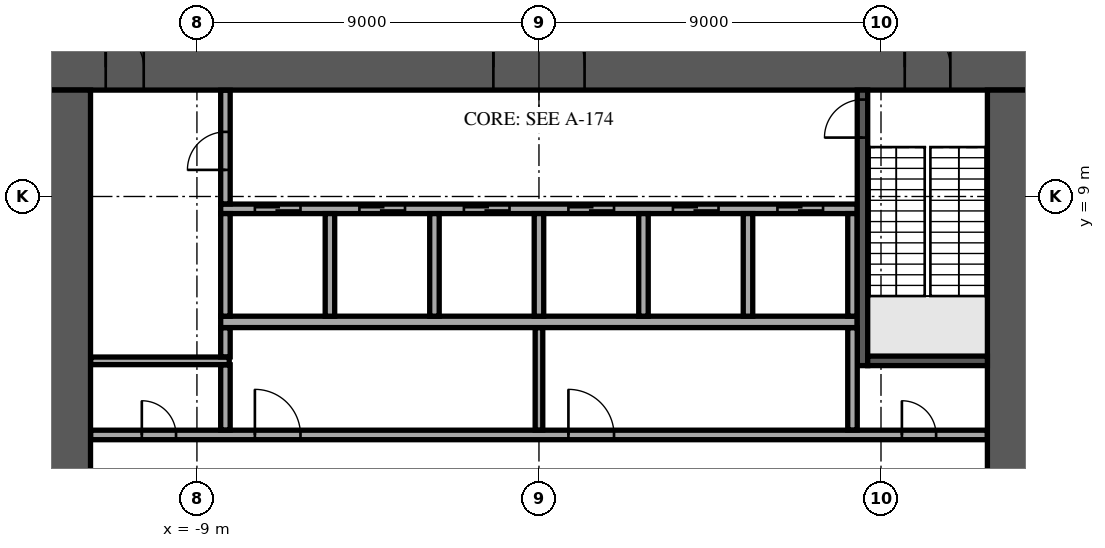
"""IFC4 building model, lengths in metres.
Left out: names, types, materials, properties, quantities, classifications, styles, units other than length and angle.
Written with IfcOpenShell. Run it as: python <this file> out.ifc"""

import sys

from ifc_helpers import new_model, si_unit, direction, frame, frame_2d, origin, place, context, subcontext, project, spatial, rectangle, extrude, element, fill, save


model = new_model("IFC4")
c1 = context("Model", 3, precision=1e-05, world=origin(), true_north=direction((0.0, 1.0)))
c2 = subcontext(c1, "Body", "Model", "MODEL_VIEW")
j1 = project(units=[si_unit("LENGTHUNIT", "METRE"), si_unit("PLANEANGLEUNIT", "RADIAN")], contexts=[c1])
p1 = place(None, origin())
s1 = spatial("IfcSite", under=j1, at=p1, CompositionType="ELEMENT")
p2 = place(p1, origin())
s2 = spatial("IfcBuilding", under=s1, at=p2, CompositionType="ELEMENT")
p3 = place(p2, frame((0.0, 0.0, 76.5)))
s3 = spatial("IfcBuildingStorey", under=s2, at=p3, CompositionType="ELEMENT", Elevation=76.5)
p4 = place(p3, frame((-13.0, 12.4, 0.0), z_axis=(0.0, 0.0, 1.0), x_axis=(1.0, 0.0, 0.0)))
e1 = element("IfcWall", 1, at=p4, inside=s3, PredefinedType="SHEAR", context=c2, shape_type="SweptSolid", body=[
    extrude(rectangle(XDim=26.0, YDim=1.2, at=frame_2d((13.0, 0.0))), origin(), (0.0, 0.0, 1.0), 5.18),
])
p5 = place(p4, frame((11.8, 0.0, 0.0)))
e2 = element("IfcOpeningElement", 2, at=p5, cuts=e1, PredefinedType="OPENING", context=c2, shape_type="SweptSolid", body=[
    extrude(rectangle(XDim=2.4, YDim=2.4, at=frame_2d((1.2, 1.2))), frame((0.0, 0.61, 0.0), z_axis=(0.0, -1.0, 0.0), x_axis=(1.0, 0.0, 0.0)), (0.0, 0.0, 1.0), 1.22),
])
p6 = place(p4, frame((22.625, 0.0, 0.0)))
e3 = element("IfcOpeningElement", 3, at=p6, cuts=e1, PredefinedType="OPENING", context=c2, shape_type="SweptSolid", body=[
    extrude(rectangle(XDim=1.2, YDim=2.1, at=frame_2d((0.6, 1.05))), frame((0.0, 0.61, 0.0), z_axis=(0.0, -1.0, 0.0), x_axis=(1.0, 0.0, 0.0)), (0.0, 0.0, 1.0), 1.22),
])
p7 = place(p4, frame((1.6, 0.0, 0.0)))
e4 = element("IfcOpeningElement", 4, at=p7, cuts=e1, PredefinedType="OPENING", context=c2, shape_type="SweptSolid", body=[
    extrude(rectangle(XDim=1.0, YDim=2.1, at=frame_2d((0.5, 1.05))), frame((0.0, 0.61, 0.0), z_axis=(0.0, -1.0, 0.0), x_axis=(1.0, 0.0, 0.0)), (0.0, 0.0, 1.0), 1.22),
])
p8 = place(p3, frame((12.4, -11.8, 0.0), z_axis=(0.0, 0.0, 1.0), x_axis=(0.0, 1.0, 0.0)))
e5 = element("IfcWall", 5, at=p8, inside=s3, PredefinedType="SHEAR", context=c2, shape_type="SweptSolid", body=[
    extrude(rectangle(XDim=23.6, YDim=1.2, at=frame_2d((11.8, 0.0))), origin(), (0.0, 0.0, 1.0), 5.18),
])
p9 = place(p8, frame((10.6, 0.0, 0.0)))
e6 = element("IfcOpeningElement", 6, at=p9, cuts=e5, PredefinedType="OPENING", context=c2, shape_type="SweptSolid", body=[
    extrude(rectangle(XDim=2.4, YDim=2.4, at=frame_2d((1.2, 1.2))), frame((0.0, 0.61, 0.0), z_axis=(0.0, -1.0, 0.0), x_axis=(1.0, 0.0, 0.0)), (0.0, 0.0, 1.0), 1.22),
])
p10 = place(p3, frame((-12.4, -11.8, 0.0), z_axis=(0.0, 0.0, 1.0), x_axis=(0.0, 1.0, 0.0)))
e7 = element("IfcWall", 7, at=p10, inside=s3, PredefinedType="SHEAR", context=c2, shape_type="SweptSolid", body=[
    extrude(rectangle(XDim=23.6, YDim=1.2, at=frame_2d((11.8, 0.0))), origin(), (0.0, 0.0, 1.0), 5.18),
])
p11 = place(p10, frame((10.6, 0.0, 0.0)))
e8 = element("IfcOpeningElement", 8, at=p11, cuts=e7, PredefinedType="OPENING", context=c2, shape_type="SweptSolid", body=[
    extrude(rectangle(XDim=2.4, YDim=2.4, at=frame_2d((1.2, 1.2))), frame((0.0, 0.61, 0.0), z_axis=(0.0, -1.0, 0.0), x_axis=(1.0, 0.0, 0.0)), (0.0, 0.0, 1.0), 1.22),
])
p12 = place(p3, frame((-8.375, 5.7, 0.0), z_axis=(0.0, 0.0, 1.0), x_axis=(1.0, 0.0, 0.0)))
e9 = element("IfcWall", 9, at=p12, inside=s3, PredefinedType="SOLIDWALL", context=c2, shape_type="SweptSolid", body=[
    extrude(rectangle(XDim=16.75, YDim=0.3, at=frame_2d((8.375, 0.0))), origin(), (0.0, 0.0, 1.0), 5.18),
])
p13 = place(p3, frame((-8.375, 8.675, 0.0), z_axis=(0.0, 0.0, 1.0), x_axis=(1.0, 0.0, 0.0)))
e10 = element("IfcWall", 10, at=p13, inside=s3, PredefinedType="SOLIDWALL", context=c2, shape_type="SweptSolid", body=[
    extrude(rectangle(XDim=16.75, YDim=0.25, at=frame_2d((8.375, 0.0))), origin(), (0.0, 0.0, 1.0), 5.18),
])
p14 = place(p13, frame((0.9, 0.0, 0.0)))
e11 = element("IfcOpeningElement", 11, at=p14, cuts=e10, PredefinedType="OPENING", context=c2, shape_type="SweptSolid", body=[
    extrude(rectangle(XDim=1.2, YDim=2.1, at=frame_2d((0.6, 1.05))), frame((0.0, 0.135, 0.0), z_axis=(0.0, -1.0, 0.0), x_axis=(1.0, 0.0, 0.0)), (0.0, 0.0, 1.0), 0.27),
])
p15 = place(p13, frame((3.65, 0.0, 0.0)))
e12 = element("IfcOpeningElement", 12, at=p15, cuts=e10, PredefinedType="OPENING", context=c2, shape_type="SweptSolid", body=[
    extrude(rectangle(XDim=1.2, YDim=2.1, at=frame_2d((0.6, 1.05))), frame((0.0, 0.135, 0.0), z_axis=(0.0, -1.0, 0.0), x_axis=(1.0, 0.0, 0.0)), (0.0, 0.0, 1.0), 0.27),
])
p16 = place(p13, frame((6.4, 0.0, 0.0)))
e13 = element("IfcOpeningElement", 13, at=p16, cuts=e10, PredefinedType="OPENING", context=c2, shape_type="SweptSolid", body=[
    extrude(rectangle(XDim=1.2, YDim=2.1, at=frame_2d((0.6, 1.05))), frame((0.0, 0.135, 0.0), z_axis=(0.0, -1.0, 0.0), x_axis=(1.0, 0.0, 0.0)), (0.0, 0.0, 1.0), 0.27),
])
p17 = place(p13, frame((9.15, 0.0, 0.0)))
e14 = element("IfcOpeningElement", 14, at=p17, cuts=e10, PredefinedType="OPENING", context=c2, shape_type="SweptSolid", body=[
    extrude(rectangle(XDim=1.2, YDim=2.1, at=frame_2d((0.6, 1.05))), frame((0.0, 0.135, 0.0), z_axis=(0.0, -1.0, 0.0), x_axis=(1.0, 0.0, 0.0)), (0.0, 0.0, 1.0), 0.27),
])
p18 = place(p13, frame((11.9, 0.0, 0.0)))
e15 = element("IfcOpeningElement", 15, at=p18, cuts=e10, PredefinedType="OPENING", context=c2, shape_type="SweptSolid", body=[
    extrude(rectangle(XDim=1.2, YDim=2.1, at=frame_2d((0.6, 1.05))), frame((0.0, 0.135, 0.0), z_axis=(0.0, -1.0, 0.0), x_axis=(1.0, 0.0, 0.0)), (0.0, 0.0, 1.0), 0.27),
])
p19 = place(p13, frame((14.65, 0.0, 0.0)))
e16 = element("IfcOpeningElement", 16, at=p19, cuts=e10, PredefinedType="OPENING", context=c2, shape_type="SweptSolid", body=[
    extrude(rectangle(XDim=1.2, YDim=2.1, at=frame_2d((0.6, 1.05))), frame((0.0, 0.135, 0.0), z_axis=(0.0, -1.0, 0.0), x_axis=(1.0, 0.0, 0.0)), (0.0, 0.0, 1.0), 0.27),
])
for number, where, z_axis, x_axis in (
    (17, (-8.25, 5.85, 0.0), (0.0, 0.0, 1.0), (0.0, 1.0, 0.0)),
    (18, (-5.5, 5.85, 0.0), (0.0, 0.0, 1.0), (0.0, 1.0, 0.0)),
    (19, (-2.75, 5.85, 0.0), (0.0, 0.0, 1.0), (0.0, 1.0, 0.0)),
    (20, (0.0, 5.85, 0.0), (0.0, 0.0, 1.0), (0.0, 1.0, 0.0)),
    (21, (2.75, 5.85, 0.0), (0.0, 0.0, 1.0), (0.0, 1.0, 0.0)),
    (22, (5.5, 5.85, 0.0), (0.0, 0.0, 1.0), (0.0, 1.0, 0.0)),
    (23, (8.25, 5.85, 0.0), (0.0, 0.0, 1.0), (0.0, 1.0, 0.0)),
):
    element("IfcWall", number, at=place(p3, frame(where, z_axis=z_axis, x_axis=x_axis)), inside=s3, PredefinedType="SOLIDWALL", context=c2, shape_type="SweptSolid", body=[
        extrude(rectangle(XDim=2.7, YDim=0.25, at=frame_2d((1.35, 0.0))), origin(), (0.0, 0.0, 1.0), 5.18),
    ])
p20 = place(p3, frame((8.512, 4.55, 0.0), z_axis=(0.0, 0.0, 1.0), x_axis=(0.0, 1.0, 0.0)))
e24 = element("IfcWall", 24, at=p20, inside=s3, PredefinedType="SOLIDWALL", context=c2, shape_type="SweptSolid", body=[
    extrude(rectangle(XDim=7.25, YDim=0.275, at=frame_2d((3.625, 0.0))), origin(), (0.0, 0.0, 1.0), 5.18),
])
p21 = place(p20, frame((6.0, 0.0, 0.0)))
e25 = element("IfcOpeningElement", 25, at=p21, cuts=e24, PredefinedType="OPENING", context=c2, shape_type="SweptSolid", body=[
    extrude(rectangle(XDim=1.0, YDim=2.1, at=frame_2d((0.5, 1.05))), frame((0.0, 0.147, 0.0), z_axis=(0.0, -1.0, 0.0), x_axis=(1.0, 0.0, 0.0)), (0.0, 0.0, 1.0), 0.295),
])
p22 = place(p3, frame((8.65, 4.675, 0.0), z_axis=(0.0, 0.0, 1.0), x_axis=(1.0, 0.0, 0.0)))
e26 = element("IfcWall", 26, at=p22, inside=s3, PredefinedType="SOLIDWALL", context=c2, shape_type="SweptSolid", body=[
    extrude(rectangle(XDim=3.15, YDim=0.25, at=frame_2d((1.575, 0.0))), origin(), (0.0, 0.0, 1.0), 5.18),
])
p23 = place(p3, frame((-11.795, 2.725, 0.0), z_axis=(0.0, 0.0, 1.0), x_axis=(1.0, 0.0, 0.0)))
e27 = element("IfcWall", 27, at=p23, inside=s3, PredefinedType="PARTITIONING", context=c2, shape_type="SweptSolid", body=[
    extrude(rectangle(XDim=23.59, YDim=0.25, at=frame_2d((11.795, 0.0))), origin(), (0.0, 0.0, 1.0), 5.18),
])
p24 = place(p23, frame((21.345, 0.0, 0.0)))
e28 = element("IfcOpeningElement", 28, at=p24, cuts=e27, PredefinedType="OPENING", context=c2, shape_type="SweptSolid", body=[
    extrude(rectangle(XDim=0.9, YDim=2.1, at=frame_2d((0.45, 1.05))), frame((0.0, 0.135, 0.0), z_axis=(0.0, -1.0, 0.0), x_axis=(1.0, 0.0, 0.0)), (0.0, 0.0, 1.0), 0.27),
])
p25 = place(p23, frame((1.345, 0.0, 0.0)))
e29 = element("IfcOpeningElement", 29, at=p25, cuts=e27, PredefinedType="OPENING", context=c2, shape_type="SweptSolid", body=[
    extrude(rectangle(XDim=0.9, YDim=2.1, at=frame_2d((0.45, 1.05))), frame((0.0, 0.135, 0.0), z_axis=(0.0, -1.0, 0.0), x_axis=(1.0, 0.0, 0.0)), (0.0, 0.0, 1.0), 0.27),
])
p26 = place(p23, frame((4.32, 0.0, 0.0)))
e30 = element("IfcOpeningElement", 30, at=p26, cuts=e27, PredefinedType="OPENING", context=c2, shape_type="SweptSolid", body=[
    extrude(rectangle(XDim=1.2, YDim=2.1, at=frame_2d((0.6, 1.05))), frame((0.0, 0.135, 0.0), z_axis=(0.0, -1.0, 0.0), x_axis=(1.0, 0.0, 0.0)), (0.0, 0.0, 1.0), 0.27),
])
p27 = place(p23, frame((12.57, 0.0, 0.0)))
e31 = element("IfcOpeningElement", 31, at=p27, cuts=e27, PredefinedType="OPENING", context=c2, shape_type="SweptSolid", body=[
    extrude(rectangle(XDim=1.2, YDim=2.1, at=frame_2d((0.6, 1.05))), frame((0.0, 0.135, 0.0), z_axis=(0.0, -1.0, 0.0), x_axis=(1.0, 0.0, 0.0)), (0.0, 0.0, 1.0), 0.27),
])
p28 = place(p3, frame((-8.25, 2.855, 0.0), z_axis=(0.0, 0.0, 1.0), x_axis=(0.0, 1.0, 0.0)))
e32 = element("IfcWall", 32, at=p28, inside=s3, PredefinedType="PARTITIONING", context=c2, shape_type="SweptSolid", body=[
    extrude(rectangle(XDim=1.715, YDim=0.25, at=frame_2d((0.857, 0.0))), origin(), (0.0, 0.0, 1.0), 5.18),
])
p29 = place(p3, frame((0.0, 2.855, 0.0), z_axis=(0.0, 0.0, 1.0), x_axis=(0.0, 1.0, 0.0)))
e33 = element("IfcWall", 33, at=p29, inside=s3, PredefinedType="PARTITIONING", context=c2, shape_type="SweptSolid", body=[
    extrude(rectangle(XDim=2.69, YDim=0.2, at=frame_2d((1.345, 0.0))), origin(), (0.0, 0.0, 1.0), 5.18),
])
p30 = place(p3, frame((8.25, 2.855, 0.0), z_axis=(0.0, 0.0, 1.0), x_axis=(0.0, 1.0, 0.0)))
e34 = element("IfcWall", 34, at=p30, inside=s3, PredefinedType="PARTITIONING", context=c2, shape_type="SweptSolid", body=[
    extrude(rectangle(XDim=2.69, YDim=0.25, at=frame_2d((1.345, 0.0))), origin(), (0.0, 0.0, 1.0), 5.18),
])
p31 = place(p3, frame((-11.795, 4.675, 0.0), z_axis=(0.0, 0.0, 1.0), x_axis=(1.0, 0.0, 0.0)))
e35 = element("IfcWall", 35, at=p31, inside=s3, PredefinedType="PARTITIONING", context=c2, shape_type="SweptSolid", body=[
    extrude(rectangle(XDim=3.645, YDim=0.2, at=frame_2d((1.823, 0.0))), origin(), (0.0, 0.0, 1.0), 5.18),
])
p32 = place(p3, frame((-8.25, 4.78, 0.0), z_axis=(0.0, 0.0, 1.0), x_axis=(0.0, 1.0, 0.0)))
e36 = element("IfcWall", 36, at=p32, inside=s3, PredefinedType="PARTITIONING", context=c2, shape_type="SweptSolid", body=[
    extrude(rectangle(XDim=0.765, YDim=0.25, at=frame_2d((0.382, 0.0))), origin(), (0.0, 0.0, 1.0), 5.18),
])
p33 = place(p3, frame((-8.25, 8.805, 0.0), z_axis=(0.0, 0.0, 1.0), x_axis=(0.0, 1.0, 0.0)))
e37 = element("IfcWall", 37, at=p33, inside=s3, PredefinedType="PARTITIONING", context=c2, shape_type="SweptSolid", body=[
    extrude(rectangle(XDim=2.99, YDim=0.25, at=frame_2d((1.495, 0.0))), origin(), (0.0, 0.0, 1.0), 5.18),
])
p34 = place(p33, frame((0.895, 0.0, 0.0)))
e38 = element("IfcOpeningElement", 38, at=p34, cuts=e37, PredefinedType="OPENING", context=c2, shape_type="SweptSolid", body=[
    extrude(rectangle(XDim=1.0, YDim=2.1, at=frame_2d((0.5, 1.05))), frame((0.0, 0.135, 0.0), z_axis=(0.0, -1.0, 0.0), x_axis=(1.0, 0.0, 0.0)), (0.0, 0.0, 1.0), 0.27),
])
p35 = place(p5, origin())
e39 = element("IfcDoor", 39, at=p35, inside=s3, OperationType="SINGLE_SWING_LEFT", PredefinedType="DOOR", context=c2, shape_type="SweptSolid", body=[
    extrude(rectangle(XDim=2.4, YDim=2.4, at=frame_2d((1.2, 1.2))), frame((0.0, 0.025, 0.0), z_axis=(0.0, -1.0, 0.0), x_axis=(1.0, 0.0, 0.0)), (0.0, 0.0, 1.0), 0.05),
])
fill(e2, e39)
p36 = place(p6, origin())
e40 = element("IfcDoor", 40, at=p36, inside=s3, OperationType="SINGLE_SWING_LEFT", PredefinedType="DOOR", context=c2, shape_type="SweptSolid", body=[
    extrude(rectangle(XDim=1.2, YDim=2.1, at=frame_2d((0.6, 1.05))), frame((0.0, 0.025, 0.0), z_axis=(0.0, -1.0, 0.0), x_axis=(1.0, 0.0, 0.0)), (0.0, 0.0, 1.0), 0.05),
])
fill(e3, e40)
p37 = place(p7, origin())
e41 = element("IfcDoor", 41, at=p37, inside=s3, OperationType="SINGLE_SWING_LEFT", PredefinedType="DOOR", context=c2, shape_type="SweptSolid", body=[
    extrude(rectangle(XDim=1.0, YDim=2.1, at=frame_2d((0.5, 1.05))), frame((0.0, 0.025, 0.0), z_axis=(0.0, -1.0, 0.0), x_axis=(1.0, 0.0, 0.0)), (0.0, 0.0, 1.0), 0.05),
])
fill(e4, e41)
p38 = place(p14, origin())
e42 = element("IfcDoor", 42, at=p38, inside=s3, OperationType="DOUBLE_DOOR_SLIDING", PredefinedType="DOOR", context=c2, shape_type="SweptSolid", body=[
    extrude(rectangle(XDim=1.2, YDim=2.1, at=frame_2d((0.6, 1.05))), frame((0.0, 0.025, 0.0), z_axis=(0.0, -1.0, 0.0), x_axis=(1.0, 0.0, 0.0)), (0.0, 0.0, 1.0), 0.05),
])
fill(e11, e42)
p39 = place(p15, origin())
e43 = element("IfcDoor", 43, at=p39, inside=s3, OperationType="DOUBLE_DOOR_SLIDING", PredefinedType="DOOR", context=c2, shape_type="SweptSolid", body=[
    extrude(rectangle(XDim=1.2, YDim=2.1, at=frame_2d((0.6, 1.05))), frame((0.0, 0.025, 0.0), z_axis=(0.0, -1.0, 0.0), x_axis=(1.0, 0.0, 0.0)), (0.0, 0.0, 1.0), 0.05),
])
fill(e12, e43)
p40 = place(p16, origin())
e44 = element("IfcDoor", 44, at=p40, inside=s3, OperationType="DOUBLE_DOOR_SLIDING", PredefinedType="DOOR", context=c2, shape_type="SweptSolid", body=[
    extrude(rectangle(XDim=1.2, YDim=2.1, at=frame_2d((0.6, 1.05))), frame((0.0, 0.025, 0.0), z_axis=(0.0, -1.0, 0.0), x_axis=(1.0, 0.0, 0.0)), (0.0, 0.0, 1.0), 0.05),
])
fill(e13, e44)
p41 = place(p17, origin())
e45 = element("IfcDoor", 45, at=p41, inside=s3, OperationType="DOUBLE_DOOR_SLIDING", PredefinedType="DOOR", context=c2, shape_type="SweptSolid", body=[
    extrude(rectangle(XDim=1.2, YDim=2.1, at=frame_2d((0.6, 1.05))), frame((0.0, 0.025, 0.0), z_axis=(0.0, -1.0, 0.0), x_axis=(1.0, 0.0, 0.0)), (0.0, 0.0, 1.0), 0.05),
])
fill(e14, e45)
p42 = place(p18, origin())
e46 = element("IfcDoor", 46, at=p42, inside=s3, OperationType="DOUBLE_DOOR_SLIDING", PredefinedType="DOOR", context=c2, shape_type="SweptSolid", body=[
    extrude(rectangle(XDim=1.2, YDim=2.1, at=frame_2d((0.6, 1.05))), frame((0.0, 0.025, 0.0), z_axis=(0.0, -1.0, 0.0), x_axis=(1.0, 0.0, 0.0)), (0.0, 0.0, 1.0), 0.05),
])
fill(e15, e46)
p43 = place(p19, origin())
e47 = element("IfcDoor", 47, at=p43, inside=s3, OperationType="DOUBLE_DOOR_SLIDING", PredefinedType="DOOR", context=c2, shape_type="SweptSolid", body=[
    extrude(rectangle(XDim=1.2, YDim=2.1, at=frame_2d((0.6, 1.05))), frame((0.0, 0.025, 0.0), z_axis=(0.0, -1.0, 0.0), x_axis=(1.0, 0.0, 0.0)), (0.0, 0.0, 1.0), 0.05),
])
fill(e16, e47)
p44 = place(p21, origin())
e48 = element("IfcDoor", 48, at=p44, inside=s3, OperationType="SINGLE_SWING_LEFT", PredefinedType="DOOR", context=c2, shape_type="SweptSolid", body=[
    extrude(rectangle(XDim=1.0, YDim=2.1, at=frame_2d((0.5, 1.05))), frame((0.0, 0.025, 0.0), z_axis=(0.0, -1.0, 0.0), x_axis=(1.0, 0.0, 0.0)), (0.0, 0.0, 1.0), 0.05),
])
fill(e25, e48)
p45 = place(p24, origin())
e49 = element("IfcDoor", 49, at=p45, inside=s3, OperationType="SINGLE_SWING_RIGHT", PredefinedType="DOOR", context=c2, shape_type="SweptSolid", body=[
    extrude(rectangle(XDim=0.9, YDim=2.1, at=frame_2d((0.45, 1.05))), frame((0.0, 0.025, 0.0), z_axis=(0.0, -1.0, 0.0), x_axis=(1.0, 0.0, 0.0)), (0.0, 0.0, 1.0), 0.05),
])
fill(e28, e49)
p46 = place(p25, origin())
e50 = element("IfcDoor", 50, at=p46, inside=s3, OperationType="SINGLE_SWING_RIGHT", PredefinedType="DOOR", context=c2, shape_type="SweptSolid", body=[
    extrude(rectangle(XDim=0.9, YDim=2.1, at=frame_2d((0.45, 1.05))), frame((0.0, 0.025, 0.0), z_axis=(0.0, -1.0, 0.0), x_axis=(1.0, 0.0, 0.0)), (0.0, 0.0, 1.0), 0.05),
])
fill(e29, e50)
p47 = place(p34, origin())
e51 = element("IfcDoor", 51, at=p47, inside=s3, OperationType="SINGLE_SWING_RIGHT", PredefinedType="DOOR", context=c2, shape_type="SweptSolid", body=[
    extrude(rectangle(XDim=1.0, YDim=2.1, at=frame_2d((0.5, 1.05))), frame((0.0, 0.025, 0.0), z_axis=(0.0, -1.0, 0.0), x_axis=(1.0, 0.0, 0.0)), (0.0, 0.0, 1.0), 0.05),
])
fill(e38, e51)
p48 = place(p26, origin())
e52 = element("IfcDoor", 52, at=p48, inside=s3, OperationType="SINGLE_SWING_LEFT", PredefinedType="DOOR", context=c2, shape_type="SweptSolid", body=[
    extrude(rectangle(XDim=1.2, YDim=2.1, at=frame_2d((0.6, 1.05))), frame((0.0, 0.025, 0.0), z_axis=(0.0, -1.0, 0.0), x_axis=(1.0, 0.0, 0.0)), (0.0, 0.0, 1.0), 0.05),
])
fill(e30, e52)
p49 = place(p27, origin())
e53 = element("IfcDoor", 53, at=p49, inside=s3, OperationType="SINGLE_SWING_LEFT", PredefinedType="DOOR", context=c2, shape_type="SweptSolid", body=[
    extrude(rectangle(XDim=1.2, YDim=2.1, at=frame_2d((0.6, 1.05))), frame((0.0, 0.025, 0.0), z_axis=(0.0, -1.0, 0.0), x_axis=(1.0, 0.0, 0.0)), (0.0, 0.0, 1.0), 0.05),
])
fill(e31, e53)
save(model, sys.argv[1])
